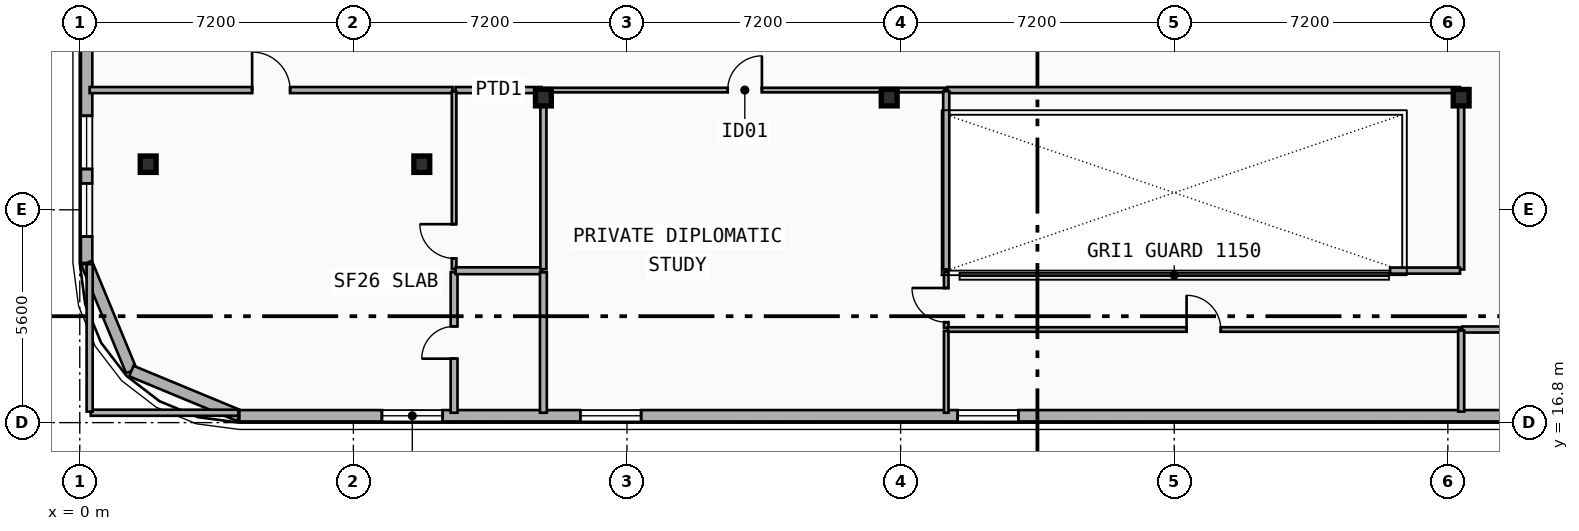
"""IFC4 building model, lengths in metres.
Left out: names, types, materials, properties, quantities, classifications, styles, units other than length and angle.
Written with IfcOpenShell. Run it as: python <this file> out.ifc"""

import sys

from ifc_helpers import new_model, si_unit, direction, frame, frame_2d, origin, origin_2d, place, context, subcontext, project, spatial, rectangle, i_section, extrude, element, fill, save


model = new_model("IFC4")
c1 = context("Model", 3, precision=1e-05, world=origin(), true_north=direction((0.0, 1.0)))
c2 = subcontext(c1, "Body", "Model", "MODEL_VIEW")
j1 = project(units=[si_unit("LENGTHUNIT", "METRE"), si_unit("PLANEANGLEUNIT", "RADIAN")], contexts=[c1])
p1 = place(None, origin())
s1 = spatial("IfcSite", under=j1, at=p1, CompositionType="ELEMENT")
p2 = place(p1, origin())
s2 = spatial("IfcBuilding", under=s1, at=p2, CompositionType="ELEMENT")
p3 = place(p2, frame((0.0, 0.0, 129.3)))
s3 = spatial("IfcBuildingStorey", under=s2, at=p3, CompositionType="ELEMENT", Elevation=129.3)
for number, where, z_axis, x_axis in (
    (1, (12.2, 25.35, 0.0), (0.0, 0.0, 1.0), (1.0, 0.0, 0.0)),
    (2, (21.3, 25.35, 0.0), (0.0, 0.0, 1.0), (1.0, 0.0, 0.0)),
    (3, (36.35, 25.35, 0.0), (0.0, 0.0, 1.0), (1.0, 0.0, 0.0)),
    (4, (9.0, 23.6, 0.0), (0.0, 0.0, 1.0), (1.0, 0.0, 0.0)),
    (5, (1.8, 23.6, 0.0), (0.0, 0.0, 1.0), (1.0, 0.0, 0.0)),
):
    element("IfcColumn", number, at=place(p3, frame(where, z_axis=z_axis, x_axis=x_axis)), inside=s3, PredefinedType="COLUMN", context=c2, shape_type="SweptSolid", body=[
        extrude(i_section(OverallWidth=0.418, OverallDepth=0.432, WebThickness=0.035, FlangeThickness=0.056, FilletRadius=0.015, at=origin_2d()), origin(), (0.0, 0.0, 1.0), 3.6),
    ])
p4 = place(p3, frame((0.18, 21.0, 0.0), z_axis=(0.0, 0.0, 1.0), x_axis=(0.0, 1.0, 0.0)))
e6 = element("IfcWall", 6, at=p4, inside=s3, PredefinedType="SOLIDWALL", context=c2, shape_type="SweptSolid", body=[
    extrude(rectangle(XDim=18.0, YDim=0.3, at=frame_2d((9.0, 0.0))), origin(), (0.0, 0.0, 1.0), 3.28),
])
p5 = place(p4, frame((7.47, 0.0, 0.65)))
e7 = element("IfcOpeningElement", 7, at=p5, cuts=e6, PredefinedType="OPENING", context=c2, shape_type="SweptSolid", body=[
    extrude(rectangle(XDim=1.4, YDim=1.8, at=frame_2d((0.7, 0.9))), frame((0.0, 0.16, 0.0), z_axis=(0.0, -1.0, 0.0), x_axis=(1.0, 0.0, 0.0)), (0.0, 0.0, 1.0), 0.32),
])
p6 = place(p4, frame((12.509, 0.0, 0.65)))
e8 = element("IfcOpeningElement", 8, at=p6, cuts=e6, PredefinedType="OPENING", context=c2, shape_type="SweptSolid", body=[
    extrude(rectangle(XDim=1.4, YDim=1.8, at=frame_2d((0.7, 0.9))), frame((0.0, 0.16, 0.0), z_axis=(0.0, -1.0, 0.0), x_axis=(1.0, 0.0, 0.0)), (0.0, 0.0, 1.0), 0.32),
])
p7 = place(p4, frame((0.697, 0.0, 0.65)))
e9 = element("IfcOpeningElement", 9, at=p7, cuts=e6, PredefinedType="OPENING", context=c2, shape_type="SweptSolid", body=[
    extrude(rectangle(XDim=1.4, YDim=1.8, at=frame_2d((0.7, 0.9))), frame((0.0, 0.16, 0.0), z_axis=(0.0, -1.0, 0.0), x_axis=(1.0, 0.0, 0.0)), (0.0, 0.0, 1.0), 0.32),
])
p8 = place(p4, frame((2.473, 0.0, 0.65)))
e10 = element("IfcOpeningElement", 10, at=p8, cuts=e6, PredefinedType="OPENING", context=c2, shape_type="SweptSolid", body=[
    extrude(rectangle(XDim=1.4, YDim=1.8, at=frame_2d((0.7, 0.9))), frame((0.0, 0.16, 0.0), z_axis=(0.0, -1.0, 0.0), x_axis=(1.0, 0.0, 0.0)), (0.0, 0.0, 1.0), 0.32),
])
for number, where, z_axis, x_axis in (
    (11, (1.357, 18.157, 0.0), (0.0, 0.0, 1.0), (-0.383, 0.924, 0.0)),
    (12, (4.2, 16.98, 0.0), (0.0, 0.0, 1.0), (-0.924, 0.383, 0.0)),
):
    element("IfcWall", number, at=place(p3, frame(where, z_axis=z_axis, x_axis=x_axis)), inside=s3, PredefinedType="SOLIDWALL", context=c2, shape_type="SweptSolid", body=[
        extrude(rectangle(XDim=3.077, YDim=0.3, at=frame_2d((1.538, 0.0))), origin(), (0.0, 0.0, 1.0), 3.28),
    ])
p9 = place(p3, frame((53.4, 16.98, 0.0), z_axis=(0.0, 0.0, 1.0), x_axis=(-1.0, 0.0, 0.0)))
e13 = element("IfcWall", 13, at=p9, inside=s3, PredefinedType="SOLIDWALL", context=c2, shape_type="SweptSolid", body=[
    extrude(rectangle(XDim=49.2, YDim=0.3, at=frame_2d((24.6, 0.0))), origin(), (0.0, 0.0, 1.0), 3.28),
])
p10 = place(p9, frame((43.85, 0.0, 0.65)))
e14 = element("IfcOpeningElement", 14, at=p10, cuts=e13, PredefinedType="OPENING", context=c2, shape_type="SweptSolid", body=[
    extrude(rectangle(XDim=1.6, YDim=1.95, at=frame_2d((0.8, 0.975))), frame((0.0, 0.16, 0.0), z_axis=(0.0, -1.0, 0.0), x_axis=(1.0, 0.0, 0.0)), (0.0, 0.0, 1.0), 0.32),
])
p11 = place(p9, frame((38.628, 0.0, 0.65)))
e15 = element("IfcOpeningElement", 15, at=p11, cuts=e13, PredefinedType="OPENING", context=c2, shape_type="SweptSolid", body=[
    extrude(rectangle(XDim=1.6, YDim=1.95, at=frame_2d((0.8, 0.975))), frame((0.0, 0.16, 0.0), z_axis=(0.0, -1.0, 0.0), x_axis=(1.0, 0.0, 0.0)), (0.0, 0.0, 1.0), 0.32),
])
p12 = place(p9, frame((28.7, 0.0, 0.8)))
e16 = element("IfcOpeningElement", 16, at=p12, cuts=e13, PredefinedType="OPENING", context=c2, shape_type="SweptSolid", body=[
    extrude(rectangle(XDim=1.6, YDim=1.95, at=frame_2d((0.8, 0.975))), frame((0.0, 0.16, 0.0), z_axis=(0.0, -1.0, 0.0), x_axis=(1.0, 0.0, 0.0)), (0.0, 0.0, 1.0), 0.32),
])
p13 = place(p9, frame((5.855, 0.0, 0.34)))
e17 = element("IfcOpeningElement", 17, at=p13, cuts=e13, PredefinedType="OPENING", context=c2, shape_type="SweptSolid", body=[
    extrude(rectangle(XDim=1.6, YDim=1.95, at=frame_2d((0.8, 0.975))), frame((0.0, 0.16, 0.0), z_axis=(0.0, -1.0, 0.0), x_axis=(1.0, 0.0, 0.0)), (0.0, 0.0, 1.0), 0.32),
])
p14 = place(p9, frame((0.812, 0.0, 0.65)))
e18 = element("IfcOpeningElement", 18, at=p14, cuts=e13, PredefinedType="OPENING", context=c2, shape_type="SweptSolid", body=[
    extrude(rectangle(XDim=1.6, YDim=1.95, at=frame_2d((0.8, 0.975))), frame((0.0, 0.16, 0.0), z_axis=(0.0, -1.0, 0.0), x_axis=(1.0, 0.0, 0.0)), (0.0, 0.0, 1.0), 0.32),
])
p15 = place(p3, frame((0.26, 25.55, 0.0), z_axis=(0.0, 0.0, 1.0), x_axis=(1.0, 0.0, 0.0)))
e19 = element("IfcWall", 19, at=p15, inside=s3, PredefinedType="PARTITIONING", context=c2, shape_type="SweptSolid", body=[
    extrude(rectangle(XDim=9.55, YDim=0.16, at=frame_2d((4.775, 0.0))), origin(), (0.0, 0.0, 1.0), 2.61),
])
p16 = place(p15, frame((4.275, 0.0, 0.0)))
e20 = element("IfcOpeningElement", 20, at=p16, cuts=e19, PredefinedType="OPENING", context=c2, shape_type="SweptSolid", body=[
    extrude(rectangle(XDim=1.0, YDim=2.15, at=frame_2d((0.5, 1.075))), frame((0.0, 0.09, 0.0), z_axis=(0.0, -1.0, 0.0), x_axis=(1.0, 0.0, 0.0)), (0.0, 0.0, 1.0), 0.18),
])
p17 = place(p3, frame((9.89, 25.55, 0.0), z_axis=(0.0, 0.0, 1.0), x_axis=(1.0, 0.0, 0.0)))
e21 = element("IfcWall", 21, at=p17, inside=s3, PredefinedType="PARTITIONING", context=c2, shape_type="SweptSolid", body=[
    extrude(rectangle(XDim=2.27, YDim=0.16, at=frame_2d((1.135, 0.0))), origin(), (0.0, 0.0, 1.0), 2.446),
])
p18 = place(p3, frame((12.24, 25.55, 0.0), z_axis=(0.0, 0.0, 1.0), x_axis=(1.0, 0.0, 0.0)))
e22 = element("IfcWall", 22, at=p18, inside=s3, PredefinedType="PARTITIONING", context=c2, shape_type="SweptSolid", body=[
    extrude(rectangle(XDim=10.52, YDim=0.12, at=frame_2d((5.26, 0.0))), origin(), (0.0, 0.0, 1.0), 2.446),
])
p19 = place(p18, frame((4.81, 0.0, 0.0)))
e23 = element("IfcOpeningElement", 23, at=p19, cuts=e22, PredefinedType="OPENING", context=c2, shape_type="SweptSolid", body=[
    extrude(rectangle(XDim=0.9, YDim=2.1, at=frame_2d((0.45, 1.05))), frame((0.0, 0.07, 0.0), z_axis=(0.0, -1.0, 0.0), x_axis=(1.0, 0.0, 0.0)), (0.0, 0.0, 1.0), 0.14),
])
p20 = place(p3, frame((22.8, 19.29, 0.0), z_axis=(0.0, 0.0, 1.0), x_axis=(0.0, 1.0, 0.0)))
e24 = element("IfcWall", 24, at=p20, inside=s3, PredefinedType="PARTITIONING", context=c2, shape_type="SweptSolid", body=[
    extrude(rectangle(XDim=1.47, YDim=0.12, at=frame_2d((0.735, 0.0))), origin(), (0.0, 0.0, 1.0), 2.72),
])
p21 = place(p20, frame((0.152, 0.0, 0.0)))
e25 = element("IfcOpeningElement", 25, at=p21, cuts=e24, PredefinedType="OPENING", context=c2, shape_type="SweptSolid", body=[
    extrude(rectangle(XDim=0.9, YDim=2.1, at=frame_2d((0.45, 1.05))), frame((0.0, 0.07, 0.0), z_axis=(0.0, -1.0, 0.0), x_axis=(1.0, 0.0, 0.0)), (0.0, 0.0, 1.0), 0.14),
])
p22 = place(p3, frame((22.84, 19.25, 0.0), z_axis=(0.0, 0.0, 1.0), x_axis=(1.0, 0.0, 0.0)))
e26 = element("IfcWall", 26, at=p22, inside=s3, PredefinedType="PARTITIONING", context=c2, shape_type="SweptSolid", body=[
    extrude(rectangle(XDim=13.47, YDim=0.12, at=frame_2d((6.735, 0.0))), origin(), (0.0, 0.0, 1.0), 2.446),
])
p23 = place(p22, frame((6.285, 0.0, 0.0)))
e27 = element("IfcOpeningElement", 27, at=p23, cuts=e26, PredefinedType="OPENING", context=c2, shape_type="SweptSolid", body=[
    extrude(rectangle(XDim=0.9, YDim=2.1, at=frame_2d((0.45, 1.05))), frame((0.0, 0.07, 0.0), z_axis=(0.0, -1.0, 0.0), x_axis=(1.0, 0.0, 0.0)), (0.0, 0.0, 1.0), 0.14),
])
p24 = place(p3, frame((9.85, 17.06, 0.0), z_axis=(0.0, 0.0, 1.0), x_axis=(0.0, 1.0, 0.0)))
e28 = element("IfcWall", 28, at=p24, inside=s3, PredefinedType="PLUMBINGWALL", context=c2, shape_type="SweptSolid", body=[
    extrude(rectangle(XDim=3.696, YDim=0.18, at=frame_2d((1.848, 0.0))), origin(), (0.0, 0.0, 1.0), 2.96),
])
p25 = place(p24, frame((1.423, 0.0, 0.0)))
e29 = element("IfcOpeningElement", 29, at=p25, cuts=e28, PredefinedType="OPENING", context=c2, shape_type="SweptSolid", body=[
    extrude(rectangle(XDim=0.85, YDim=2.1, at=frame_2d((0.425, 1.05))), frame((0.0, 0.1, 0.0), z_axis=(0.0, -1.0, 0.0), x_axis=(1.0, 0.0, 0.0)), (0.0, 0.0, 1.0), 0.2),
])
p26 = place(p3, frame((9.85, 20.836, 0.0), z_axis=(0.0, 0.0, 1.0), x_axis=(0.0, 1.0, 0.0)))
e30 = element("IfcWall", 30, at=p26, inside=s3, PredefinedType="PARTITIONING", context=c2, shape_type="SweptSolid", body=[
    extrude(rectangle(XDim=4.674, YDim=0.12, at=frame_2d((2.337, 0.0))), origin(), (0.0, 0.0, 1.0), 2.76),
])
p27 = place(p26, frame((0.286, 0.0, 0.0)))
e31 = element("IfcOpeningElement", 31, at=p27, cuts=e30, PredefinedType="OPENING", context=c2, shape_type="SweptSolid", body=[
    extrude(rectangle(XDim=0.9, YDim=2.1, at=frame_2d((0.45, 1.05))), frame((0.0, 0.07, 0.0), z_axis=(0.0, -1.0, 0.0), x_axis=(1.0, 0.0, 0.0)), (0.0, 0.0, 1.0), 0.14),
])
p28 = place(p3, frame((9.89, 20.796, 0.0), z_axis=(0.0, 0.0, 1.0), x_axis=(1.0, 0.0, 0.0)))
e32 = element("IfcWall", 32, at=p28, inside=s3, PredefinedType="PLUMBINGWALL", context=c2, shape_type="SweptSolid", body=[
    extrude(rectangle(XDim=2.27, YDim=0.18, at=frame_2d((1.135, 0.0))), origin(), (0.0, 0.0, 1.0), 2.446),
])
p29 = place(p3, frame((12.2, 17.06, 0.0), z_axis=(0.0, 0.0, 1.0), x_axis=(0.0, 1.0, 0.0)))
e33 = element("IfcWall", 33, at=p29, inside=s3, PredefinedType="PLUMBINGWALL", context=c2, shape_type="SweptSolid", body=[
    extrude(rectangle(XDim=3.696, YDim=0.18, at=frame_2d((1.848, 0.0))), origin(), (0.0, 0.0, 1.0), 2.446),
])
p30 = place(p3, frame((12.2, 20.836, 0.0), z_axis=(0.0, 0.0, 1.0), x_axis=(0.0, 1.0, 0.0)))
e34 = element("IfcWall", 34, at=p30, inside=s3, PredefinedType="PARTITIONING", context=c2, shape_type="SweptSolid", body=[
    extrude(rectangle(XDim=4.674, YDim=0.16, at=frame_2d((2.337, 0.0))), origin(), (0.0, 0.0, 1.0), 2.446),
])
p31 = place(p3, frame((22.8, 17.06, 0.0), z_axis=(0.0, 0.0, 1.0), x_axis=(0.0, 1.0, 0.0)))
e35 = element("IfcWall", 35, at=p31, inside=s3, PredefinedType="PARTITIONING", context=c2, shape_type="SweptSolid", body=[
    extrude(rectangle(XDim=2.15, YDim=0.12, at=frame_2d((1.075, 0.0))), origin(), (0.0, 0.0, 1.0), 2.96),
])
p32 = place(p3, frame((22.83, 25.55, 0.0), z_axis=(0.0, 0.0, 1.0), x_axis=(1.0, 0.0, 0.0)))
e36 = element("IfcWall", 36, at=p32, inside=s3, PredefinedType="PARTITIONING", context=c2, shape_type="SweptSolid", body=[
    extrude(rectangle(XDim=13.49, YDim=0.16, at=frame_2d((6.745, 0.0))), origin(), (0.0, 0.0, 1.0), 2.446),
])
p33 = place(p3, frame((36.38, 19.25, 0.0), z_axis=(0.0, 0.0, 1.0), x_axis=(1.0, 0.0, 0.0)))
e37 = element("IfcWall", 37, at=p33, inside=s3, PredefinedType="PARTITIONING", context=c2, shape_type="SweptSolid", body=[
    extrude(rectangle(XDim=1.94, YDim=0.16, at=frame_2d((0.97, 0.0))), origin(), (0.0, 0.0, 1.0), 2.446),
])
p34 = place(p3, frame((36.35, 20.83, 0.0), z_axis=(0.0, 0.0, 1.0), x_axis=(0.0, 1.0, 0.0)))
e38 = element("IfcWall", 38, at=p34, inside=s3, PredefinedType="PARTITIONING", context=c2, shape_type="SweptSolid", body=[
    extrude(rectangle(XDim=4.69, YDim=0.16, at=frame_2d((2.345, 0.0))), origin(), (0.0, 0.0, 1.0), 2.446),
])
p35 = place(p3, frame((34.48, 20.8, 0.0), z_axis=(0.0, 0.0, 1.0), x_axis=(1.0, 0.0, 0.0)))
e39 = element("IfcWall", 39, at=p35, inside=s3, PredefinedType="PARTITIONING", context=c2, shape_type="SweptSolid", body=[
    extrude(rectangle(XDim=1.84, YDim=0.16, at=frame_2d((0.92, 0.0))), origin(), (0.0, 0.0, 1.0), 2.446),
])
p36 = place(p3, frame((0.29, 17.06, 0.0), z_axis=(0.0, 0.0, 1.0), x_axis=(1.0, 0.0, 0.0)))
e40 = element("IfcWall", 40, at=p36, inside=s3, PredefinedType="PARTITIONING", context=c2, shape_type="SweptSolid", body=[
    extrude(rectangle(XDim=3.88, YDim=0.16, at=frame_2d((1.94, 0.0))), origin(), (0.0, 0.0, 1.0), 2.76),
])
p37 = place(p3, frame((0.26, 17.09, 0.0), z_axis=(0.0, 0.0, 1.0), x_axis=(0.0, 1.0, 0.0)))
e41 = element("IfcWall", 41, at=p37, inside=s3, PredefinedType="PARTITIONING", context=c2, shape_type="SweptSolid", body=[
    extrude(rectangle(XDim=3.88, YDim=0.16, at=frame_2d((1.94, 0.0))), origin(), (0.0, 0.0, 1.0), 3.28),
])
p38 = place(p3, frame((22.8, 20.83, 0.0), z_axis=(0.0, 0.0, 1.0), x_axis=(0.0, 1.0, 0.0)))
e42 = element("IfcWall", 42, at=p38, inside=s3, PredefinedType="PARTITIONING", context=c2, shape_type="SweptSolid", body=[
    extrude(rectangle(XDim=4.69, YDim=0.16, at=frame_2d((2.345, 0.0))), origin(), (0.0, 0.0, 1.0), 2.72),
])
p39 = place(p3, frame((36.35, 17.09, 0.0), z_axis=(0.0, 0.0, 1.0), x_axis=(0.0, 1.0, 0.0)))
e43 = element("IfcWall", 43, at=p39, inside=s3, PredefinedType="PARTITIONING", context=c2, shape_type="SweptSolid", body=[
    extrude(rectangle(XDim=2.13, YDim=0.16, at=frame_2d((1.065, 0.0))), origin(), (0.0, 0.0, 1.0), 2.446),
])
p40 = place(p7, origin())
e44 = element("IfcWindow", 44, at=p40, inside=s3, PartitioningType="SINGLE_PANEL", PredefinedType="WINDOW", context=c2, shape_type="SweptSolid", body=[
    extrude(rectangle(XDim=1.4, YDim=1.8, at=frame_2d((0.7, 0.9))), frame((0.0, 0.03, 0.0), z_axis=(0.0, -1.0, 0.0), x_axis=(1.0, 0.0, 0.0)), (0.0, 0.0, 1.0), 0.06),
])
fill(e9, e44)
p41 = place(p8, origin())
e45 = element("IfcWindow", 45, at=p41, inside=s3, PartitioningType="SINGLE_PANEL", PredefinedType="WINDOW", context=c2, shape_type="SweptSolid", body=[
    extrude(rectangle(XDim=1.4, YDim=1.8, at=frame_2d((0.7, 0.9))), frame((0.0, 0.03, 0.0), z_axis=(0.0, -1.0, 0.0), x_axis=(1.0, 0.0, 0.0)), (0.0, 0.0, 1.0), 0.06),
])
fill(e10, e45)
p42 = place(p10, origin())
e46 = element("IfcWindow", 46, at=p42, inside=s3, PartitioningType="SINGLE_PANEL", PredefinedType="WINDOW", context=c2, shape_type="SweptSolid", body=[
    extrude(rectangle(XDim=1.6, YDim=1.95, at=frame_2d((0.8, 0.975))), frame((0.0, 0.03, 0.0), z_axis=(0.0, -1.0, 0.0), x_axis=(1.0, 0.0, 0.0)), (0.0, 0.0, 1.0), 0.06),
])
fill(e14, e46)
p43 = place(p11, origin())
e47 = element("IfcWindow", 47, at=p43, inside=s3, PartitioningType="SINGLE_PANEL", PredefinedType="WINDOW", context=c2, shape_type="SweptSolid", body=[
    extrude(rectangle(XDim=1.6, YDim=1.95, at=frame_2d((0.8, 0.975))), frame((0.0, 0.03, 0.0), z_axis=(0.0, -1.0, 0.0), x_axis=(1.0, 0.0, 0.0)), (0.0, 0.0, 1.0), 0.06),
])
fill(e15, e47)
p44 = place(p12, origin())
e48 = element("IfcWindow", 48, at=p44, inside=s3, PartitioningType="SINGLE_PANEL", PredefinedType="WINDOW", context=c2, shape_type="SweptSolid", body=[
    extrude(rectangle(XDim=1.6, YDim=1.95, at=frame_2d((0.8, 0.975))), frame((0.0, 0.03, 0.0), z_axis=(0.0, -1.0, 0.0), x_axis=(1.0, 0.0, 0.0)), (0.0, 0.0, 1.0), 0.06),
])
fill(e16, e48)
p45 = place(p16, origin())
e49 = element("IfcDoor", 49, at=p45, inside=s3, OperationType="SINGLE_SWING_LEFT", PredefinedType="DOOR", context=c2, shape_type="SweptSolid", body=[
    extrude(rectangle(XDim=1.0, YDim=2.15, at=frame_2d((0.5, 1.075))), frame((0.0, 0.025, 0.0), z_axis=(0.0, -1.0, 0.0), x_axis=(1.0, 0.0, 0.0)), (0.0, 0.0, 1.0), 0.05),
])
fill(e20, e49)
p46 = place(p19, origin())
e50 = element("IfcDoor", 50, at=p46, inside=s3, OperationType="SINGLE_SWING_RIGHT", PredefinedType="DOOR", context=c2, shape_type="SweptSolid", body=[
    extrude(rectangle(XDim=0.9, YDim=2.1, at=frame_2d((0.45, 1.05))), frame((0.0, 0.025, 0.0), z_axis=(0.0, -1.0, 0.0), x_axis=(1.0, 0.0, 0.0)), (0.0, 0.0, 1.0), 0.05),
])
fill(e23, e50)
p47 = place(p21, origin())
e51 = element("IfcDoor", 51, at=p47, inside=s3, OperationType="SINGLE_SWING_RIGHT", PredefinedType="DOOR", context=c2, shape_type="SweptSolid", body=[
    extrude(rectangle(XDim=0.9, YDim=2.1, at=frame_2d((0.45, 1.05))), frame((0.0, 0.025, 0.0), z_axis=(0.0, -1.0, 0.0), x_axis=(1.0, 0.0, 0.0)), (0.0, 0.0, 1.0), 0.05),
])
fill(e25, e51)
p48 = place(p23, origin())
e52 = element("IfcDoor", 52, at=p48, inside=s3, OperationType="SINGLE_SWING_LEFT", PredefinedType="DOOR", context=c2, shape_type="SweptSolid", body=[
    extrude(rectangle(XDim=0.9, YDim=2.1, at=frame_2d((0.45, 1.05))), frame((0.0, 0.025, 0.0), z_axis=(0.0, -1.0, 0.0), x_axis=(1.0, 0.0, 0.0)), (0.0, 0.0, 1.0), 0.05),
])
fill(e27, e52)
p49 = place(p25, origin())
e53 = element("IfcDoor", 53, at=p49, inside=s3, OperationType="SINGLE_SWING_LEFT", PredefinedType="DOOR", context=c2, shape_type="SweptSolid", body=[
    extrude(rectangle(XDim=0.85, YDim=2.1, at=frame_2d((0.425, 1.05))), frame((0.0, 0.025, 0.0), z_axis=(0.0, -1.0, 0.0), x_axis=(1.0, 0.0, 0.0)), (0.0, 0.0, 1.0), 0.05),
])
fill(e29, e53)
p50 = place(p27, origin())
e54 = element("IfcDoor", 54, at=p50, inside=s3, OperationType="SINGLE_SWING_RIGHT", PredefinedType="DOOR", context=c2, shape_type="SweptSolid", body=[
    extrude(rectangle(XDim=0.9, YDim=2.1, at=frame_2d((0.45, 1.05))), frame((0.0, 0.025, 0.0), z_axis=(0.0, -1.0, 0.0), x_axis=(1.0, 0.0, 0.0)), (0.0, 0.0, 1.0), 0.05),
])
fill(e31, e54)
save(model, sys.argv[1])
